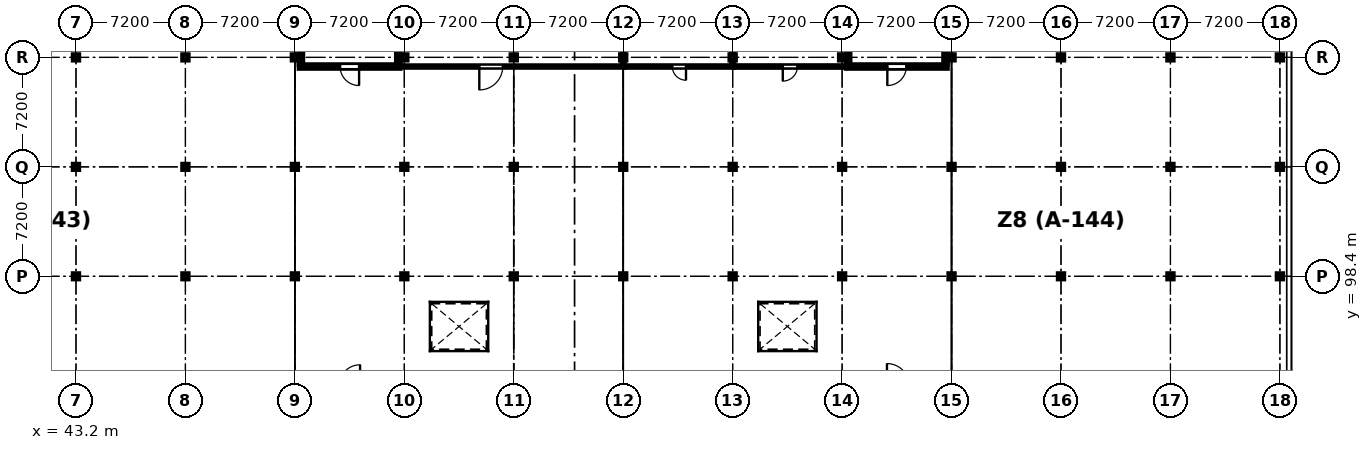
"""IFC4 building model, lengths in metres.
Left out: names, types, materials, properties, quantities, classifications, styles, units other than length and angle.
Written with IfcOpenShell. Run it as: python <this file> out.ifc"""

import sys

from ifc_helpers import new_model, si_unit, direction, frame, frame_2d, origin, origin_2d, place, context, subcontext, project, spatial, rectangle, i_section, extrude, element, fill, save


model = new_model("IFC4")
c1 = context("Model", 3, precision=1e-05, world=origin(), true_north=direction((0.0, 1.0)))
c2 = subcontext(c1, "Body", "Model", "MODEL_VIEW")
j1 = project(units=[si_unit("LENGTHUNIT", "METRE"), si_unit("PLANEANGLEUNIT", "RADIAN")], contexts=[c1])
p1 = place(None, origin())
s1 = spatial("IfcSite", under=j1, at=p1, CompositionType="ELEMENT")
p2 = place(p1, origin())
s2 = spatial("IfcBuilding", under=s1, at=p2, CompositionType="ELEMENT")
p3 = place(p2, frame((0.0, 0.0, 17.1)))
s3 = spatial("IfcBuildingStorey", under=s2, at=p3, CompositionType="ELEMENT", Elevation=17.1)
for number, where, z_axis, x_axis in (
    (1, (43.2, 98.4, 0.0), (0.0, 0.0, 1.0), (1.0, 0.0, 0.0)),
    (2, (43.2, 105.6, 0.0), (0.0, 0.0, 1.0), (1.0, 0.0, 0.0)),
):
    element("IfcColumn", number, at=place(p3, frame(where, z_axis=z_axis, x_axis=x_axis)), inside=s3, PredefinedType="COLUMN", context=c2, shape_type="SweptSolid", body=[
        extrude(i_section(OverallWidth=0.368, OverallDepth=0.356, WebThickness=0.011, FlangeThickness=0.018, FilletRadius=0.015, at=origin_2d()), origin(), (0.0, 0.0, 1.0), 3.9),
    ])
p4 = place(p3, frame((43.2, 112.8, 0.0), z_axis=(0.0, 0.0, 1.0), x_axis=(1.0, 0.0, 0.0)))
e3 = element("IfcColumn", 3, at=p4, inside=s3, PredefinedType="COLUMN", context=c2, shape_type="SweptSolid", body=[
    extrude(i_section(OverallWidth=0.371, OverallDepth=0.363, WebThickness=0.013, FlangeThickness=0.022, FilletRadius=0.015, at=origin_2d()), origin(), (0.0, 0.0, 1.0), 3.9),
])
for number, where, z_axis, x_axis in (
    (4, (50.4, 98.4, 0.0), (0.0, 0.0, 1.0), (1.0, 0.0, 0.0)),
    (5, (50.4, 105.6, 0.0), (0.0, 0.0, 1.0), (1.0, 0.0, 0.0)),
):
    element("IfcColumn", number, at=place(p3, frame(where, z_axis=z_axis, x_axis=x_axis)), inside=s3, PredefinedType="COLUMN", context=c2, shape_type="SweptSolid", body=[
        extrude(i_section(OverallWidth=0.368, OverallDepth=0.356, WebThickness=0.011, FlangeThickness=0.018, FilletRadius=0.015, at=origin_2d()), origin(), (0.0, 0.0, 1.0), 3.9),
    ])
p5 = place(p3, frame((50.4, 112.8, 0.0), z_axis=(0.0, 0.0, 1.0), x_axis=(1.0, 0.0, 0.0)))
e6 = element("IfcColumn", 6, at=p5, inside=s3, PredefinedType="COLUMN", context=c2, shape_type="SweptSolid", body=[
    extrude(i_section(OverallWidth=0.371, OverallDepth=0.363, WebThickness=0.013, FlangeThickness=0.022, FilletRadius=0.015, at=origin_2d()), origin(), (0.0, 0.0, 1.0), 3.9),
])
for number, where, z_axis, x_axis in (
    (7, (57.6, 98.4, 0.0), (0.0, 0.0, 1.0), (1.0, 0.0, 0.0)),
    (8, (57.6, 105.6, 0.0), (0.0, 0.0, 1.0), (1.0, 0.0, 0.0)),
):
    element("IfcColumn", number, at=place(p3, frame(where, z_axis=z_axis, x_axis=x_axis)), inside=s3, PredefinedType="COLUMN", context=c2, shape_type="SweptSolid", body=[
        extrude(i_section(OverallWidth=0.368, OverallDepth=0.356, WebThickness=0.011, FlangeThickness=0.018, FilletRadius=0.015, at=origin_2d()), origin(), (0.0, 0.0, 1.0), 3.9),
    ])
p6 = place(p3, frame((57.6, 112.8, 0.0), z_axis=(0.0, 0.0, 1.0), x_axis=(1.0, 0.0, 0.0)))
e9 = element("IfcColumn", 9, at=p6, inside=s3, PredefinedType="COLUMN", context=c2, shape_type="SweptSolid", body=[
    extrude(i_section(OverallWidth=0.371, OverallDepth=0.363, WebThickness=0.013, FlangeThickness=0.022, FilletRadius=0.015, at=origin_2d()), origin(), (0.0, 0.0, 1.0), 3.9),
])
for number, where, z_axis, x_axis in (
    (10, (64.8, 98.4, 0.0), (0.0, 0.0, 1.0), (1.0, 0.0, 0.0)),
    (11, (64.8, 105.6, 0.0), (0.0, 0.0, 1.0), (1.0, 0.0, 0.0)),
):
    element("IfcColumn", number, at=place(p3, frame(where, z_axis=z_axis, x_axis=x_axis)), inside=s3, PredefinedType="COLUMN", context=c2, shape_type="SweptSolid", body=[
        extrude(i_section(OverallWidth=0.368, OverallDepth=0.356, WebThickness=0.011, FlangeThickness=0.018, FilletRadius=0.015, at=origin_2d()), origin(), (0.0, 0.0, 1.0), 3.9),
    ])
p7 = place(p3, frame((64.8, 112.8, 0.0), z_axis=(0.0, 0.0, 1.0), x_axis=(1.0, 0.0, 0.0)))
e12 = element("IfcColumn", 12, at=p7, inside=s3, PredefinedType="COLUMN", context=c2, shape_type="SweptSolid", body=[
    extrude(i_section(OverallWidth=0.371, OverallDepth=0.363, WebThickness=0.013, FlangeThickness=0.022, FilletRadius=0.015, at=origin_2d()), origin(), (0.0, 0.0, 1.0), 3.9),
])
for number, where, z_axis, x_axis in (
    (13, (72.0, 98.4, 0.0), (0.0, 0.0, 1.0), (1.0, 0.0, 0.0)),
    (14, (72.0, 105.6, 0.0), (0.0, 0.0, 1.0), (1.0, 0.0, 0.0)),
):
    element("IfcColumn", number, at=place(p3, frame(where, z_axis=z_axis, x_axis=x_axis)), inside=s3, PredefinedType="COLUMN", context=c2, shape_type="SweptSolid", body=[
        extrude(i_section(OverallWidth=0.368, OverallDepth=0.356, WebThickness=0.011, FlangeThickness=0.018, FilletRadius=0.015, at=origin_2d()), origin(), (0.0, 0.0, 1.0), 3.9),
    ])
p8 = place(p3, frame((72.0, 112.8, 0.0), z_axis=(0.0, 0.0, 1.0), x_axis=(1.0, 0.0, 0.0)))
e15 = element("IfcColumn", 15, at=p8, inside=s3, PredefinedType="COLUMN", context=c2, shape_type="SweptSolid", body=[
    extrude(i_section(OverallWidth=0.371, OverallDepth=0.363, WebThickness=0.013, FlangeThickness=0.022, FilletRadius=0.015, at=origin_2d()), origin(), (0.0, 0.0, 1.0), 3.9),
])
for number, where, z_axis, x_axis in (
    (16, (79.2, 98.4, 0.0), (0.0, 0.0, 1.0), (1.0, 0.0, 0.0)),
    (17, (79.2, 105.6, 0.0), (0.0, 0.0, 1.0), (1.0, 0.0, 0.0)),
):
    element("IfcColumn", number, at=place(p3, frame(where, z_axis=z_axis, x_axis=x_axis)), inside=s3, PredefinedType="COLUMN", context=c2, shape_type="SweptSolid", body=[
        extrude(i_section(OverallWidth=0.368, OverallDepth=0.356, WebThickness=0.011, FlangeThickness=0.018, FilletRadius=0.015, at=origin_2d()), origin(), (0.0, 0.0, 1.0), 3.9),
    ])
p9 = place(p3, frame((79.2, 112.8, 0.0), z_axis=(0.0, 0.0, 1.0), x_axis=(1.0, 0.0, 0.0)))
e18 = element("IfcColumn", 18, at=p9, inside=s3, PredefinedType="COLUMN", context=c2, shape_type="SweptSolid", body=[
    extrude(i_section(OverallWidth=0.371, OverallDepth=0.363, WebThickness=0.013, FlangeThickness=0.022, FilletRadius=0.015, at=origin_2d()), origin(), (0.0, 0.0, 1.0), 3.9),
])
for number, where, z_axis, x_axis in (
    (19, (86.4, 98.4, 0.0), (0.0, 0.0, 1.0), (1.0, 0.0, 0.0)),
    (20, (86.4, 105.6, 0.0), (0.0, 0.0, 1.0), (1.0, 0.0, 0.0)),
):
    element("IfcColumn", number, at=place(p3, frame(where, z_axis=z_axis, x_axis=x_axis)), inside=s3, PredefinedType="COLUMN", context=c2, shape_type="SweptSolid", body=[
        extrude(i_section(OverallWidth=0.368, OverallDepth=0.356, WebThickness=0.011, FlangeThickness=0.018, FilletRadius=0.015, at=origin_2d()), origin(), (0.0, 0.0, 1.0), 3.9),
    ])
p10 = place(p3, frame((86.4, 112.8, 0.0), z_axis=(0.0, 0.0, 1.0), x_axis=(1.0, 0.0, 0.0)))
e21 = element("IfcColumn", 21, at=p10, inside=s3, PredefinedType="COLUMN", context=c2, shape_type="SweptSolid", body=[
    extrude(i_section(OverallWidth=0.371, OverallDepth=0.363, WebThickness=0.013, FlangeThickness=0.022, FilletRadius=0.015, at=origin_2d()), origin(), (0.0, 0.0, 1.0), 3.9),
])
for number, where, z_axis, x_axis in (
    (22, (93.6, 98.4, 0.0), (0.0, 0.0, 1.0), (1.0, 0.0, 0.0)),
    (23, (93.6, 105.6, 0.0), (0.0, 0.0, 1.0), (1.0, 0.0, 0.0)),
):
    element("IfcColumn", number, at=place(p3, frame(where, z_axis=z_axis, x_axis=x_axis)), inside=s3, PredefinedType="COLUMN", context=c2, shape_type="SweptSolid", body=[
        extrude(i_section(OverallWidth=0.368, OverallDepth=0.356, WebThickness=0.011, FlangeThickness=0.018, FilletRadius=0.015, at=origin_2d()), origin(), (0.0, 0.0, 1.0), 3.9),
    ])
p11 = place(p3, frame((93.6, 112.8, 0.0), z_axis=(0.0, 0.0, 1.0), x_axis=(1.0, 0.0, 0.0)))
e24 = element("IfcColumn", 24, at=p11, inside=s3, PredefinedType="COLUMN", context=c2, shape_type="SweptSolid", body=[
    extrude(i_section(OverallWidth=0.371, OverallDepth=0.363, WebThickness=0.013, FlangeThickness=0.022, FilletRadius=0.015, at=origin_2d()), origin(), (0.0, 0.0, 1.0), 3.9),
])
for number, where, z_axis, x_axis in (
    (25, (100.8, 98.4, 0.0), (0.0, 0.0, 1.0), (1.0, 0.0, 0.0)),
    (26, (100.8, 105.6, 0.0), (0.0, 0.0, 1.0), (1.0, 0.0, 0.0)),
):
    element("IfcColumn", number, at=place(p3, frame(where, z_axis=z_axis, x_axis=x_axis)), inside=s3, PredefinedType="COLUMN", context=c2, shape_type="SweptSolid", body=[
        extrude(i_section(OverallWidth=0.368, OverallDepth=0.356, WebThickness=0.011, FlangeThickness=0.018, FilletRadius=0.015, at=origin_2d()), origin(), (0.0, 0.0, 1.0), 3.9),
    ])
p12 = place(p3, frame((100.8, 112.8, 0.0), z_axis=(0.0, 0.0, 1.0), x_axis=(1.0, 0.0, 0.0)))
e27 = element("IfcColumn", 27, at=p12, inside=s3, PredefinedType="COLUMN", context=c2, shape_type="SweptSolid", body=[
    extrude(i_section(OverallWidth=0.371, OverallDepth=0.363, WebThickness=0.013, FlangeThickness=0.022, FilletRadius=0.015, at=origin_2d()), origin(), (0.0, 0.0, 1.0), 3.9),
])
for number, where, z_axis, x_axis in (
    (28, (108.0, 98.4, 0.0), (0.0, 0.0, 1.0), (1.0, 0.0, 0.0)),
    (29, (108.0, 105.6, 0.0), (0.0, 0.0, 1.0), (1.0, 0.0, 0.0)),
):
    element("IfcColumn", number, at=place(p3, frame(where, z_axis=z_axis, x_axis=x_axis)), inside=s3, PredefinedType="COLUMN", context=c2, shape_type="SweptSolid", body=[
        extrude(i_section(OverallWidth=0.368, OverallDepth=0.356, WebThickness=0.011, FlangeThickness=0.018, FilletRadius=0.015, at=origin_2d()), origin(), (0.0, 0.0, 1.0), 3.9),
    ])
p13 = place(p3, frame((108.0, 112.8, 0.0), z_axis=(0.0, 0.0, 1.0), x_axis=(1.0, 0.0, 0.0)))
e30 = element("IfcColumn", 30, at=p13, inside=s3, PredefinedType="COLUMN", context=c2, shape_type="SweptSolid", body=[
    extrude(i_section(OverallWidth=0.371, OverallDepth=0.363, WebThickness=0.013, FlangeThickness=0.022, FilletRadius=0.015, at=origin_2d()), origin(), (0.0, 0.0, 1.0), 3.9),
])
for number, where, z_axis, x_axis in (
    (31, (115.2, 98.4, 0.0), (0.0, 0.0, 1.0), (1.0, 0.0, 0.0)),
    (32, (115.2, 105.6, 0.0), (0.0, 0.0, 1.0), (1.0, 0.0, 0.0)),
):
    element("IfcColumn", number, at=place(p3, frame(where, z_axis=z_axis, x_axis=x_axis)), inside=s3, PredefinedType="COLUMN", context=c2, shape_type="SweptSolid", body=[
        extrude(i_section(OverallWidth=0.368, OverallDepth=0.356, WebThickness=0.011, FlangeThickness=0.018, FilletRadius=0.015, at=origin_2d()), origin(), (0.0, 0.0, 1.0), 3.9),
    ])
p14 = place(p3, frame((115.2, 112.8, 0.0), z_axis=(0.0, 0.0, 1.0), x_axis=(1.0, 0.0, 0.0)))
e33 = element("IfcColumn", 33, at=p14, inside=s3, PredefinedType="COLUMN", context=c2, shape_type="SweptSolid", body=[
    extrude(i_section(OverallWidth=0.371, OverallDepth=0.363, WebThickness=0.013, FlangeThickness=0.022, FilletRadius=0.015, at=origin_2d()), origin(), (0.0, 0.0, 1.0), 3.9),
])
for number, where, z_axis, x_axis in (
    (34, (122.4, 98.4, 0.0), (0.0, 0.0, 1.0), (1.0, 0.0, 0.0)),
    (35, (122.4, 105.6, 0.0), (0.0, 0.0, 1.0), (1.0, 0.0, 0.0)),
):
    element("IfcColumn", number, at=place(p3, frame(where, z_axis=z_axis, x_axis=x_axis)), inside=s3, PredefinedType="COLUMN", context=c2, shape_type="SweptSolid", body=[
        extrude(i_section(OverallWidth=0.368, OverallDepth=0.356, WebThickness=0.011, FlangeThickness=0.018, FilletRadius=0.015, at=origin_2d()), origin(), (0.0, 0.0, 1.0), 3.9),
    ])
p15 = place(p3, frame((122.4, 112.8, 0.0), z_axis=(0.0, 0.0, 1.0), x_axis=(1.0, 0.0, 0.0)))
e36 = element("IfcColumn", 36, at=p15, inside=s3, PredefinedType="COLUMN", context=c2, shape_type="SweptSolid", body=[
    extrude(i_section(OverallWidth=0.371, OverallDepth=0.363, WebThickness=0.013, FlangeThickness=0.022, FilletRadius=0.015, at=origin_2d()), origin(), (0.0, 0.0, 1.0), 3.9),
])
p16 = place(p3, frame((64.525, 112.2, 0.0), z_axis=(0.0, 0.0, 1.0), x_axis=(-1.0, 0.0, 0.0)))
e37 = element("IfcWall", 37, at=p16, inside=s3, PredefinedType="PARTITIONING", context=c2, shape_type="SweptSolid", body=[
    extrude(rectangle(XDim=6.65, YDim=0.25, at=frame_2d((3.325, 0.0))), origin(), (0.0, 0.0, 1.0), 2.863),
])
p17 = place(p16, frame((2.7, 0.0, 0.0)))
e38 = element("IfcOpeningElement", 38, at=p17, cuts=e37, PredefinedType="OPENING", context=c2, shape_type="SweptSolid", body=[
    extrude(rectangle(XDim=1.25, YDim=2.2, at=frame_2d((0.625, 1.1))), frame((0.0, 0.135, 0.0), z_axis=(0.0, -1.0, 0.0), x_axis=(1.0, 0.0, 0.0)), (0.0, 0.0, 1.0), 0.27),
])
for number, where, z_axis, x_axis in (
    (39, (58.0, 112.327, 0.0), (0.0, 0.0, 1.0), (0.0, 1.0, 0.0)),
    (40, (64.4, 115.998, 0.0), (0.0, 0.0, 1.0), (0.0, -1.0, 0.0)),
):
    element("IfcWall", number, at=place(p3, frame(where, z_axis=z_axis, x_axis=x_axis)), inside=s3, PredefinedType="PARTITIONING", context=c2, shape_type="SweptSolid", body=[
        extrude(rectangle(XDim=3.671, YDim=0.25, at=frame_2d((1.835, 0.0))), origin(), (0.0, 0.0, 1.0), 2.863),
    ])
p18 = place(p3, frame((100.525, 112.2, 0.0), z_axis=(0.0, 0.0, 1.0), x_axis=(-1.0, 0.0, 0.0)))
e41 = element("IfcWall", 41, at=p18, inside=s3, PredefinedType="PARTITIONING", context=c2, shape_type="SweptSolid", body=[
    extrude(rectangle(XDim=6.65, YDim=0.25, at=frame_2d((3.325, 0.0))), origin(), (0.0, 0.0, 1.0), 2.863),
])
p19 = place(p18, frame((2.7, 0.0, 0.0)))
e42 = element("IfcOpeningElement", 42, at=p19, cuts=e41, PredefinedType="OPENING", context=c2, shape_type="SweptSolid", body=[
    extrude(rectangle(XDim=1.25, YDim=2.2, at=frame_2d((0.625, 1.1))), frame((0.0, 0.135, 0.0), z_axis=(0.0, -1.0, 0.0), x_axis=(1.0, 0.0, 0.0)), (0.0, 0.0, 1.0), 0.27),
])
for number, where, z_axis, x_axis in (
    (43, (94.0, 112.327, 0.0), (0.0, 0.0, 1.0), (0.0, 1.0, 0.0)),
    (44, (100.4, 116.011, 0.0), (0.0, 0.0, 1.0), (0.0, -1.0, 0.0)),
):
    element("IfcWall", number, at=place(p3, frame(where, z_axis=z_axis, x_axis=x_axis)), inside=s3, PredefinedType="PARTITIONING", context=c2, shape_type="SweptSolid", body=[
        extrude(rectangle(XDim=3.684, YDim=0.25, at=frame_2d((1.842, 0.0))), origin(), (0.0, 0.0, 1.0), 2.863),
    ])
p20 = place(p3, frame((79.28, 112.2, 0.0), z_axis=(0.0, 0.0, 1.0), x_axis=(-1.0, 0.0, 0.0)))
e45 = element("IfcWall", 45, at=p20, inside=s3, PredefinedType="PARTITIONING", context=c2, shape_type="SweptSolid", body=[
    extrude(rectangle(XDim=14.753, YDim=0.115, at=frame_2d((7.376, 0.0))), origin(), (0.0, 0.0, 1.0), 2.863),
])
p21 = place(p20, frame((8.007, 0.0, 0.0)))
e46 = element("IfcOpeningElement", 46, at=p21, cuts=e45, PredefinedType="OPENING", context=c2, shape_type="SweptSolid", body=[
    extrude(rectangle(XDim=1.54, YDim=2.1, at=frame_2d((0.77, 1.05))), frame((0.0, 0.067, 0.0), z_axis=(0.0, -1.0, 0.0), x_axis=(1.0, 0.0, 0.0)), (0.0, 0.0, 1.0), 0.135),
])
p22 = place(p3, frame((86.48, 112.2, 0.0), z_axis=(0.0, 0.0, 1.0), x_axis=(-1.0, 0.0, 0.0)))
e47 = element("IfcWall", 47, at=p22, inside=s3, PredefinedType="PARTITIONING", context=c2, shape_type="SweptSolid", body=[
    extrude(rectangle(XDim=7.198, YDim=0.12, at=frame_2d((3.599, 0.0))), origin(), (0.0, 0.0, 1.0), 2.863),
])
p23 = place(p22, frame((3.149, 0.0, 0.0)))
e48 = element("IfcOpeningElement", 48, at=p23, cuts=e47, PredefinedType="OPENING", context=c2, shape_type="SweptSolid", body=[
    extrude(rectangle(XDim=0.9, YDim=2.16, at=frame_2d((0.45, 1.08))), frame((0.0, 0.07, 0.0), z_axis=(0.0, -1.0, 0.0), x_axis=(1.0, 0.0, 0.0)), (0.0, 0.0, 1.0), 0.14),
])
p24 = place(p3, frame((93.873, 112.2, 0.0), z_axis=(0.0, 0.0, 1.0), x_axis=(-1.0, 0.0, 0.0)))
e49 = element("IfcWall", 49, at=p24, inside=s3, PredefinedType="PARTITIONING", context=c2, shape_type="SweptSolid", body=[
    extrude(rectangle(XDim=7.391, YDim=0.125, at=frame_2d((3.696, 0.0))), origin(), (0.0, 0.0, 1.0), 2.863),
])
p25 = place(p24, frame((3.216, 0.0, 0.0)))
e50 = element("IfcOpeningElement", 50, at=p25, cuts=e49, PredefinedType="OPENING", context=c2, shape_type="SweptSolid", body=[
    extrude(rectangle(XDim=0.96, YDim=2.16, at=frame_2d((0.48, 1.08))), frame((0.0, 0.073, 0.0), z_axis=(0.0, -1.0, 0.0), x_axis=(1.0, 0.0, 0.0)), (0.0, 0.0, 1.0), 0.145),
])
p26 = place(p3, frame((79.2, 116.056, 0.0), z_axis=(0.0, 0.0, 1.0), x_axis=(0.0, -1.0, 0.0)))
e51 = element("IfcWall", 51, at=p26, inside=s3, PredefinedType="PARTITIONING", context=c2, shape_type="SweptSolid", body=[
    extrude(rectangle(XDim=3.794, YDim=0.16, at=frame_2d((1.897, 0.0))), origin(), (0.0, 0.0, 1.0), 2.863),
])
p27 = place(p3, frame((86.4, 116.053, 0.0), z_axis=(0.0, 0.0, 1.0), x_axis=(0.0, -1.0, 0.0)))
e52 = element("IfcWall", 52, at=p27, inside=s3, PredefinedType="PARTITIONING", context=c2, shape_type="SweptSolid", body=[
    extrude(rectangle(XDim=3.789, YDim=0.165, at=frame_2d((1.895, 0.0))), origin(), (0.0, 0.0, 1.0), 2.863),
])
p28 = place(p17, origin())
e53 = element("IfcDoor", 53, at=p28, inside=s3, OperationType="SINGLE_SWING_LEFT", PredefinedType="DOOR", context=c2, shape_type="SweptSolid", body=[
    extrude(rectangle(XDim=1.25, YDim=2.2, at=frame_2d((0.625, 1.1))), frame((0.0, 0.025, 0.0), z_axis=(0.0, -1.0, 0.0), x_axis=(1.0, 0.0, 0.0)), (0.0, 0.0, 1.0), 0.05),
])
fill(e38, e53)
p29 = place(p19, origin())
e54 = element("IfcDoor", 54, at=p29, inside=s3, OperationType="SINGLE_SWING_RIGHT", PredefinedType="DOOR", context=c2, shape_type="SweptSolid", body=[
    extrude(rectangle(XDim=1.25, YDim=2.2, at=frame_2d((0.625, 1.1))), frame((0.0, 0.025, 0.0), z_axis=(0.0, -1.0, 0.0), x_axis=(1.0, 0.0, 0.0)), (0.0, 0.0, 1.0), 0.05),
])
fill(e42, e54)
p30 = place(p21, origin())
e55 = element("IfcDoor", 55, at=p30, inside=s3, OperationType="SINGLE_SWING_RIGHT", PredefinedType="DOOR", context=c2, shape_type="SweptSolid", body=[
    extrude(rectangle(XDim=1.54, YDim=2.1, at=frame_2d((0.77, 1.05))), frame((0.0, 0.025, 0.0), z_axis=(0.0, -1.0, 0.0), x_axis=(1.0, 0.0, 0.0)), (0.0, 0.0, 1.0), 0.05),
])
fill(e46, e55)
p31 = place(p23, origin())
e56 = element("IfcDoor", 56, at=p31, inside=s3, OperationType="SINGLE_SWING_LEFT", PredefinedType="DOOR", context=c2, shape_type="SweptSolid", body=[
    extrude(rectangle(XDim=0.9, YDim=2.16, at=frame_2d((0.45, 1.08))), frame((0.0, 0.025, 0.0), z_axis=(0.0, -1.0, 0.0), x_axis=(1.0, 0.0, 0.0)), (0.0, 0.0, 1.0), 0.05),
])
fill(e48, e56)
p32 = place(p25, origin())
e57 = element("IfcDoor", 57, at=p32, inside=s3, OperationType="SINGLE_SWING_RIGHT", PredefinedType="DOOR", context=c2, shape_type="SweptSolid", body=[
    extrude(rectangle(XDim=0.96, YDim=2.16, at=frame_2d((0.48, 1.08))), frame((0.0, 0.025, 0.0), z_axis=(0.0, -1.0, 0.0), x_axis=(1.0, 0.0, 0.0)), (0.0, 0.0, 1.0), 0.05),
])
fill(e50, e57)
save(model, sys.argv[1])
